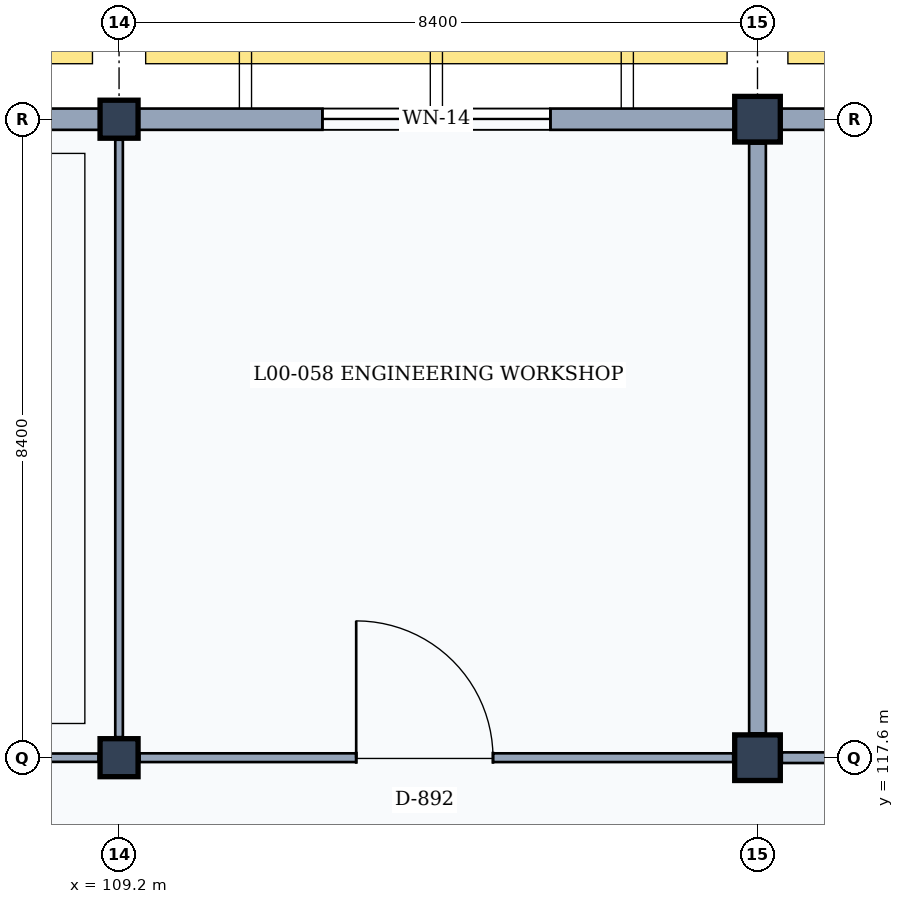
"""IFC4 building model, lengths in metres.
Left out: names, types, materials, properties, quantities, classifications, styles, units other than length and angle.
Written with IfcOpenShell. Run it as: python <this file> out.ifc"""

import sys

from ifc_helpers import new_model, si_unit, direction, frame, frame_2d, origin, origin_2d, place, context, subcontext, project, spatial, rectangle, extrude, element, fill, save


model = new_model("IFC4")
c1 = context("Model", 3, precision=1e-05, world=origin(), true_north=direction((0.0, 1.0)))
c2 = subcontext(c1, "Body", "Model", "MODEL_VIEW")
j1 = project(units=[si_unit("LENGTHUNIT", "METRE"), si_unit("PLANEANGLEUNIT", "RADIAN")], contexts=[c1])
p1 = place(None, origin())
s1 = spatial("IfcSite", under=j1, at=p1, CompositionType="ELEMENT")
p2 = place(p1, origin())
s2 = spatial("IfcBuilding", under=s1, at=p2, CompositionType="ELEMENT")
p3 = place(p2, origin())
s3 = spatial("IfcBuildingStorey", under=s2, at=p3, CompositionType="ELEMENT", Elevation=0.0)
for number, where, z_axis, x_axis in (
    (1, (109.2, 117.6, 0.0), (0.0, 0.0, 1.0), (1.0, 0.0, 0.0)),
    (2, (109.2, 126.0, 0.0), (0.0, 0.0, 1.0), (1.0, 0.0, 0.0)),
):
    element("IfcColumn", number, at=place(p3, frame(where, z_axis=z_axis, x_axis=x_axis)), inside=s3, PredefinedType="COLUMN", context=c2, shape_type="SweptSolid", body=[
        extrude(rectangle(XDim=0.5, YDim=0.5, at=origin_2d()), origin(), (0.0, 0.0, 1.0), 4.8),
    ])
for number, where, z_axis, x_axis in (
    (3, (117.6, 117.6, 0.0), (0.0, 0.0, 1.0), (1.0, 0.0, 0.0)),
    (4, (117.6, 126.0, 0.0), (0.0, 0.0, 1.0), (1.0, 0.0, 0.0)),
):
    element("IfcColumn", number, at=place(p3, frame(where, z_axis=z_axis, x_axis=x_axis)), inside=s3, PredefinedType="COLUMN", context=c2, shape_type="SweptSolid", body=[
        extrude(rectangle(XDim=0.6, YDim=0.6, at=origin_2d()), origin(), (0.0, 0.0, 1.0), 4.8),
    ])
p4 = place(p3, frame((101.05, 126.0, 0.0), z_axis=(0.0, 0.0, 1.0), x_axis=(1.0, 0.0, 0.0)))
e5 = element("IfcWall", 5, at=p4, inside=s3, PredefinedType="SOLIDWALL", context=c2, shape_type="SweptSolid", body=[
    extrude(rectangle(XDim=7.9, YDim=0.28, at=frame_2d((3.95, 0.0))), origin(), (0.0, 0.0, 1.0), 3.96),
])
p5 = place(p4, frame((3.05, 0.0, 0.95)))
e6 = element("IfcOpeningElement", 6, at=p5, cuts=e5, PredefinedType="OPENING", context=c2, shape_type="SweptSolid", body=[
    extrude(rectangle(XDim=1.8, YDim=1.5, at=frame_2d((0.9, 0.75))), frame((0.0, 0.15, 0.0), z_axis=(0.0, -1.0, 0.0), x_axis=(1.0, 0.0, 0.0)), (0.0, 0.0, 1.0), 0.3),
])
p6 = place(p3, frame((109.45, 126.0, 0.0), z_axis=(0.0, 0.0, 1.0), x_axis=(1.0, 0.0, 0.0)))
e7 = element("IfcWall", 7, at=p6, inside=s3, PredefinedType="SOLIDWALL", context=c2, shape_type="SweptSolid", body=[
    extrude(rectangle(XDim=7.85, YDim=0.28, at=frame_2d((3.925, 0.0))), origin(), (0.0, 0.0, 1.0), 3.96),
])
p7 = place(p6, frame((2.425, 0.0, 0.95)))
e8 = element("IfcOpeningElement", 8, at=p7, cuts=e7, PredefinedType="OPENING", context=c2, shape_type="SweptSolid", body=[
    extrude(rectangle(XDim=3.0, YDim=1.8, at=frame_2d((1.5, 0.9))), frame((0.0, 0.15, 0.0), z_axis=(0.0, -1.0, 0.0), x_axis=(1.0, 0.0, 0.0)), (0.0, 0.0, 1.0), 0.3),
])
p8 = place(p3, frame((117.9, 126.0, 0.0), z_axis=(0.0, 0.0, 1.0), x_axis=(1.0, 0.0, 0.0)))
e9 = element("IfcWall", 9, at=p8, inside=s3, PredefinedType="SOLIDWALL", context=c2, shape_type="SweptSolid", body=[
    extrude(rectangle(XDim=7.8, YDim=0.28, at=frame_2d((3.9, 0.0))), origin(), (0.0, 0.0, 1.0), 3.96),
])
p9 = place(p8, frame((3.3, 0.0, 0.95)))
e10 = element("IfcOpeningElement", 10, at=p9, cuts=e9, PredefinedType="OPENING", context=c2, shape_type="SweptSolid", body=[
    extrude(rectangle(XDim=1.2, YDim=1.8, at=frame_2d((0.6, 0.9))), frame((0.0, 0.15, 0.0), z_axis=(0.0, -1.0, 0.0), x_axis=(1.0, 0.0, 0.0)), (0.0, 0.0, 1.0), 0.3),
])
p10 = place(p3, frame((101.07, 117.6, 0.0), z_axis=(0.0, 0.0, 1.0), x_axis=(1.0, 0.0, 0.0)))
e11 = element("IfcWall", 11, at=p10, inside=s3, PredefinedType="PARTITIONING", context=c2, shape_type="SweptSolid", body=[
    extrude(rectangle(XDim=7.86, YDim=0.11, at=frame_2d((3.93, 0.0))), origin(), (0.0, 0.0, 1.0), 3.92),
])
p11 = place(p10, frame((2.85, 0.0, 0.0)))
e12 = element("IfcOpeningElement", 12, at=p11, cuts=e11, PredefinedType="OPENING", context=c2, shape_type="SweptSolid", body=[
    extrude(rectangle(XDim=1.8, YDim=2.3, at=frame_2d((0.9, 1.15))), frame((0.0, 0.065, 0.0), z_axis=(0.0, -1.0, 0.0), x_axis=(1.0, 0.0, 0.0)), (0.0, 0.0, 1.0), 0.13),
])
p12 = place(p3, frame((109.2, 117.87, 0.0), z_axis=(0.0, 0.0, 1.0), x_axis=(0.0, 1.0, 0.0)))
e13 = element("IfcWall", 13, at=p12, inside=s3, PredefinedType="MOVABLE", context=c2, shape_type="SweptSolid", body=[
    extrude(rectangle(XDim=7.86, YDim=0.1, at=frame_2d((3.93, 0.0))), origin(), (0.0, 0.0, 1.0), 3.92),
])
p13 = place(p3, frame((109.47, 117.6, 0.0), z_axis=(0.0, 0.0, 1.0), x_axis=(1.0, 0.0, 0.0)))
e14 = element("IfcWall", 14, at=p13, inside=s3, PredefinedType="PARTITIONING", context=c2, shape_type="SweptSolid", body=[
    extrude(rectangle(XDim=7.81, YDim=0.115, at=frame_2d((3.905, 0.0))), origin(), (0.0, 0.0, 1.0), 3.92),
])
p14 = place(p13, frame((2.85, 0.0, 0.0)))
e15 = element("IfcOpeningElement", 15, at=p14, cuts=e14, PredefinedType="OPENING", context=c2, shape_type="SweptSolid", body=[
    extrude(rectangle(XDim=1.8, YDim=2.3, at=frame_2d((0.9, 1.15))), frame((0.0, 0.067, 0.0), z_axis=(0.0, -1.0, 0.0), x_axis=(1.0, 0.0, 0.0)), (0.0, 0.0, 1.0), 0.135),
])
p15 = place(p3, frame((117.6, 117.92, 0.0), z_axis=(0.0, 0.0, 1.0), x_axis=(0.0, 1.0, 0.0)))
e16 = element("IfcWall", 16, at=p15, inside=s3, PredefinedType="PARTITIONING", context=c2, shape_type="SweptSolid", body=[
    extrude(rectangle(XDim=7.76, YDim=0.22, at=frame_2d((3.88, 0.0))), origin(), (0.0, 0.0, 1.0), 3.92),
])
p16 = place(p3, frame((117.92, 117.6, 0.0), z_axis=(0.0, 0.0, 1.0), x_axis=(1.0, 0.0, 0.0)))
e17 = element("IfcWall", 17, at=p16, inside=s3, PredefinedType="PARTITIONING", context=c2, shape_type="SweptSolid", body=[
    extrude(rectangle(XDim=7.76, YDim=0.14, at=frame_2d((3.88, 0.0))), origin(), (0.0, 0.0, 1.0), 3.92),
])
p17 = place(p16, frame((2.85, 0.0, 0.0)))
e18 = element("IfcOpeningElement", 18, at=p17, cuts=e17, PredefinedType="OPENING", context=c2, shape_type="SweptSolid", body=[
    extrude(rectangle(XDim=1.8, YDim=2.3, at=frame_2d((0.9, 1.15))), frame((0.0, 0.08, 0.0), z_axis=(0.0, -1.0, 0.0), x_axis=(1.0, 0.0, 0.0)), (0.0, 0.0, 1.0), 0.16),
])
p18 = place(p7, origin())
e19 = element("IfcWindow", 19, at=p18, inside=s3, PartitioningType="SINGLE_PANEL", PredefinedType="WINDOW", context=c2, shape_type="SweptSolid", body=[
    extrude(rectangle(XDim=3.0, YDim=1.8, at=frame_2d((1.5, 0.9))), frame((0.0, 0.03, 0.0), z_axis=(0.0, -1.0, 0.0), x_axis=(1.0, 0.0, 0.0)), (0.0, 0.0, 1.0), 0.06),
])
fill(e8, e19)
p19 = place(p14, origin())
e20 = element("IfcDoor", 20, at=p19, inside=s3, OperationType="SINGLE_SWING_LEFT", PredefinedType="DOOR", context=c2, shape_type="SweptSolid", body=[
    extrude(rectangle(XDim=1.8, YDim=2.3, at=frame_2d((0.9, 1.15))), frame((0.0, 0.025, 0.0), z_axis=(0.0, -1.0, 0.0), x_axis=(1.0, 0.0, 0.0)), (0.0, 0.0, 1.0), 0.05),
])
fill(e15, e20)
save(model, sys.argv[1])
